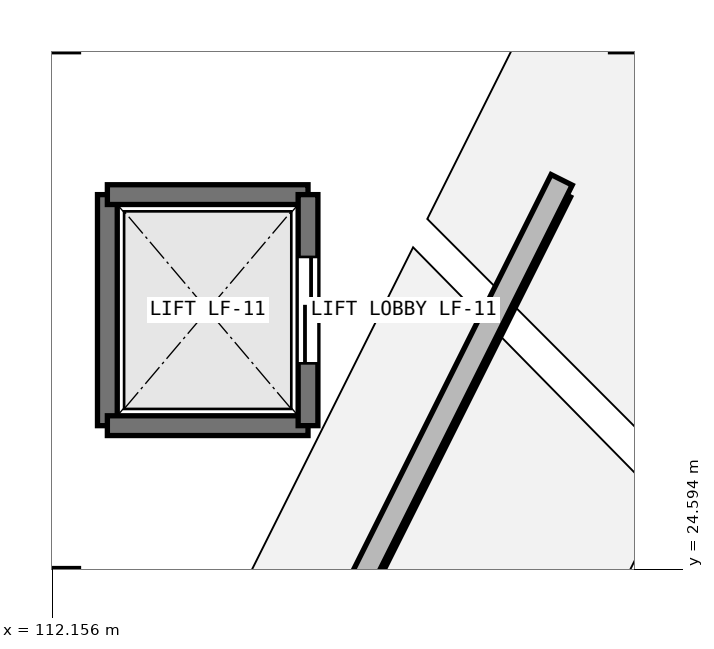
"""IFC4 building model, lengths in metres.
Left out: names, types, materials, properties, quantities, classifications, styles, units other than length and angle.
Written with IfcOpenShell. Run it as: python <this file> out.ifc"""

import sys

from ifc_helpers import new_model, si_unit, direction, frame, frame_2d, origin, place, context, subcontext, project, spatial, rectangle, extrude, element, fill, save


model = new_model("IFC4")
c1 = context("Model", 3, precision=1e-05, world=origin(), true_north=direction((0.0, 1.0)))
c2 = subcontext(c1, "Body", "Model", "MODEL_VIEW")
j1 = project(units=[si_unit("LENGTHUNIT", "METRE"), si_unit("PLANEANGLEUNIT", "RADIAN")], contexts=[c1])
p1 = place(None, origin())
s1 = spatial("IfcSite", under=j1, at=p1, CompositionType="ELEMENT")
p2 = place(p1, origin())
s2 = spatial("IfcBuilding", under=s1, at=p2, CompositionType="ELEMENT")
p3 = place(p2, frame((0.0, 0.0, 15.0)))
s3 = spatial("IfcBuildingStorey", under=s2, at=p3, CompositionType="ELEMENT", Elevation=15.0)
p4 = place(p3, frame((118.857, 29.714, 0.0), z_axis=(0.0, 0.0, 1.0), x_axis=(-0.447200857411, -0.894433559931, 0.0)))
e1 = element("IfcWall", 1, at=p4, inside=s3, PredefinedType="SOLIDWALL", context=c2, shape_type="SweptSolid", body=[
    extrude(rectangle(XDim=7.667, YDim=0.31, at=frame_2d((3.833, 0.0))), origin(), (0.0, 0.0, 1.0), 4.5),
])
p5 = place(p3, frame((112.88, 26.48, 0.0), z_axis=(0.0, 0.0, 1.0), x_axis=(0.0, 1.0, 0.0)))
e2 = element("IfcWall", 2, at=p5, inside=s3, PredefinedType="SHEAR", context=c2, shape_type="SweptSolid", body=[
    extrude(rectangle(XDim=3.04, YDim=0.26, at=frame_2d((1.52, 0.0))), origin(), (0.0, 0.0, 1.0), 4.5),
])
for number, where, z_axis, x_axis in (
    (3, (112.88, 29.52, 0.0), (0.0, 0.0, 1.0), (1.0, 0.0, 0.0)),
    (4, (115.52, 26.48, 0.0), (0.0, 0.0, 1.0), (-1.0, 0.0, 0.0)),
):
    element("IfcWall", number, at=place(p3, frame(where, z_axis=z_axis, x_axis=x_axis)), inside=s3, PredefinedType="SHEAR", context=c2, shape_type="SweptSolid", body=[
        extrude(rectangle(XDim=2.64, YDim=0.26, at=frame_2d((1.32, 0.0))), origin(), (0.0, 0.0, 1.0), 4.5),
    ])
p6 = place(p3, frame((115.52, 29.52, 0.0), z_axis=(0.0, 0.0, 1.0), x_axis=(0.0, -1.0, 0.0)))
e5 = element("IfcWall", 5, at=p6, inside=s3, PredefinedType="SHEAR", context=c2, shape_type="SweptSolid", body=[
    extrude(rectangle(XDim=3.04, YDim=0.26, at=frame_2d((1.52, 0.0))), origin(), (0.0, 0.0, 1.0), 4.5),
])
p7 = place(p6, frame((0.82, 0.0, 0.0)))
e6 = element("IfcOpeningElement", 6, at=p7, cuts=e5, PredefinedType="OPENING", context=c2, shape_type="SweptSolid", body=[
    extrude(rectangle(XDim=1.4, YDim=2.2, at=frame_2d((0.7, 1.1))), frame((0.0, 0.14, 0.0), z_axis=(0.0, -1.0, 0.0), x_axis=(1.0, 0.0, 0.0)), (0.0, 0.0, 1.0), 0.28),
])
p8 = place(p7, origin())
e7 = element("IfcDoor", 7, at=p8, inside=s3, OperationType="SLIDING_TO_LEFT", PredefinedType="DOOR", context=c2, shape_type="SweptSolid", body=[
    extrude(rectangle(XDim=1.4, YDim=2.2, at=frame_2d((0.7, 1.1))), frame((0.0, 0.025, 0.0), z_axis=(0.0, -1.0, 0.0), x_axis=(1.0, 0.0, 0.0)), (0.0, 0.0, 1.0), 0.05),
])
fill(e6, e7)
save(model, sys.argv[1])
